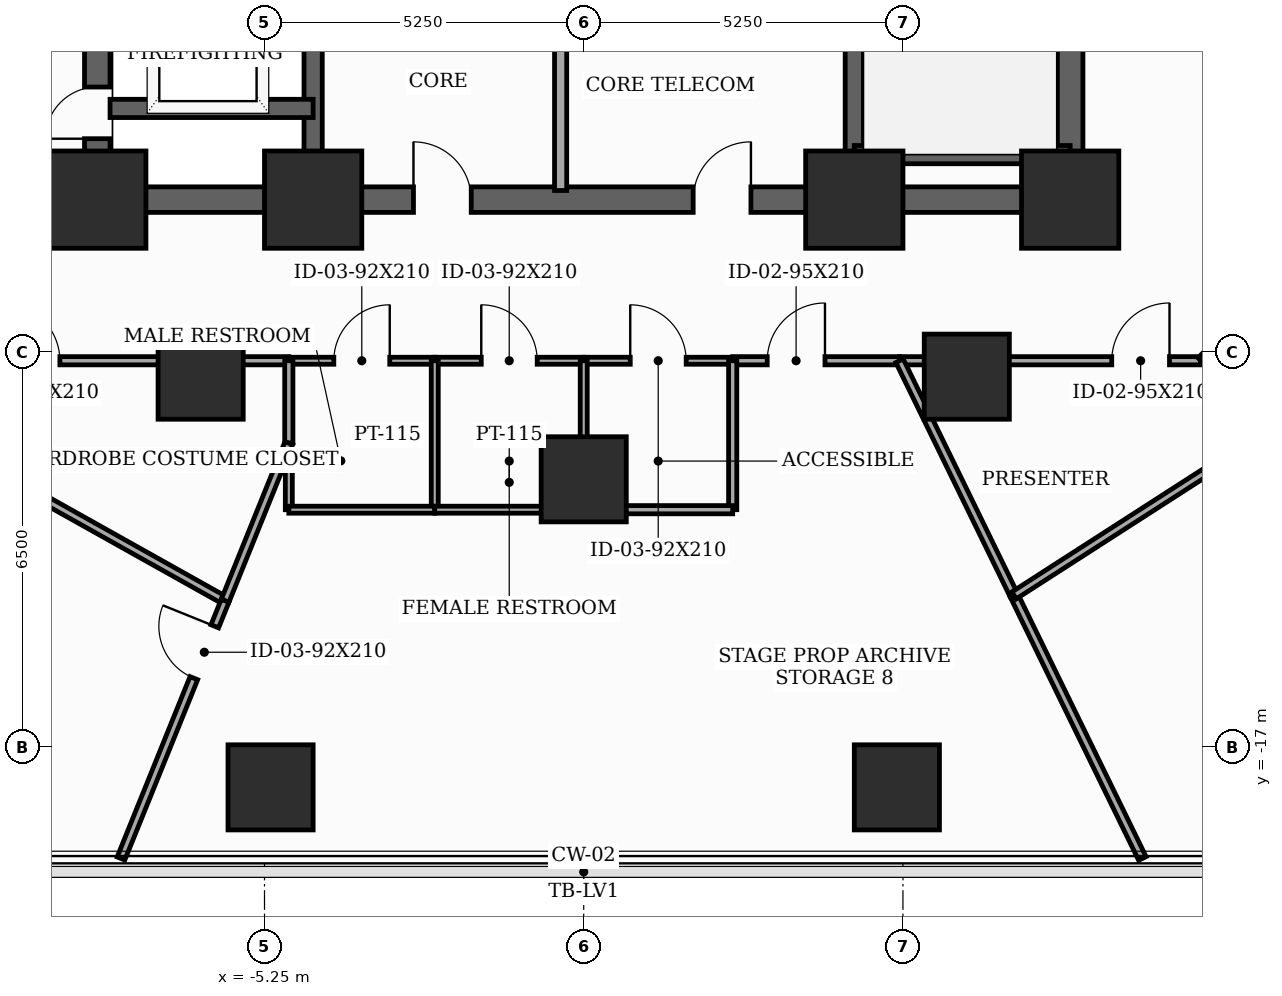
"""IFC4 building model, lengths in metres.
Left out: names, types, materials, properties, quantities, classifications, styles, units other than length and angle.
Written with IfcOpenShell. Run it as: python <this file> out.ifc"""

import sys

from ifc_helpers import new_model, si_unit, direction, frame, frame_2d, origin, origin_2d, place, context, subcontext, project, spatial, rectangle, extrude, element, fill, save


model = new_model("IFC4")
c1 = context("Model", 3, precision=1e-05, world=origin(), true_north=direction((0.0, 1.0)))
c2 = subcontext(c1, "Body", "Model", "MODEL_VIEW")
j1 = project(units=[si_unit("LENGTHUNIT", "METRE"), si_unit("PLANEANGLEUNIT", "RADIAN")], contexts=[c1])
p1 = place(None, origin())
s1 = spatial("IfcSite", under=j1, at=p1, CompositionType="ELEMENT")
p2 = place(p1, origin())
s2 = spatial("IfcBuilding", under=s1, at=p2, CompositionType="ELEMENT")
p3 = place(p2, frame((0.0, 0.0, 37.1)))
s3 = spatial("IfcBuildingStorey", under=s2, at=p3, CompositionType="ELEMENT", Elevation=37.1)
for number, where, z_axis, x_axis in (
    (1, (-8.0, -8.0, 0.0), (0.0, 0.0, 1.0), (1.0, 0.0, 0.0)),
    (2, (-4.45, -8.0, 0.0), (0.0, 0.0, 1.0), (1.0, 0.0, 0.0)),
    (3, (4.45, -8.0, 0.0), (0.0, 0.0, 1.0), (1.0, 0.0, 0.0)),
    (4, (8.0, -8.0, 0.0), (0.0, 0.0, 1.0), (1.0, 0.0, 0.0)),
):
    element("IfcColumn", number, at=place(p3, frame(where, z_axis=z_axis, x_axis=x_axis)), inside=s3, PredefinedType="COLUMN", context=c2, shape_type="SweptSolid", body=[
        extrude(rectangle(XDim=1.6, YDim=1.6, at=origin_2d()), origin(), (0.0, 0.0, 1.0), 3.7),
    ])
for number, where, z_axis, x_axis in (
    (5, (-6.3, -10.912, 0.0), (0.0, 0.0, 1.0), (1.0, 0.0, 0.0)),
    (6, (0.0, -12.6, 0.0), (0.0, 0.0, 1.0), (1.0, 0.0, 0.0)),
    (7, (6.3, -10.912, 0.0), (0.0, 0.0, 1.0), (1.0, 0.0, 0.0)),
    (8, (-5.15, -17.667, 0.0), (0.0, 0.0, 1.0), (1.0, 0.0, 0.0)),
    (9, (5.15, -17.667, 0.0), (0.0, 0.0, 1.0), (1.0, 0.0, 0.0)),
):
    element("IfcColumn", number, at=place(p3, frame(where, z_axis=z_axis, x_axis=x_axis)), inside=s3, PredefinedType="COLUMN", context=c2, shape_type="SweptSolid", body=[
        extrude(rectangle(XDim=1.4, YDim=1.4, at=origin_2d()), origin(), (0.0, 0.0, 1.0), 3.7),
    ])
p4 = place(p3, frame((-8.0, -8.0, 0.0), z_axis=(0.0, 0.0, 1.0), x_axis=(0.0, 1.0, 0.0)))
e10 = element("IfcWall", 10, at=p4, inside=s3, PredefinedType="SHEAR", context=c2, shape_type="SweptSolid", body=[
    extrude(rectangle(XDim=16.0, YDim=0.42, at=frame_2d((8.0, 0.0))), origin(), (0.0, 0.0, 1.0), 3.5),
])
p5 = place(p4, frame((1.002, 0.0, 0.0)))
e11 = element("IfcOpeningElement", 11, at=p5, cuts=e10, PredefinedType="OPENING", context=c2, shape_type="SweptSolid", body=[
    extrude(rectangle(XDim=0.85, YDim=2.02, at=frame_2d((0.425, 1.01))), frame((0.0, 0.22, 0.0), z_axis=(0.0, -1.0, 0.0), x_axis=(1.0, 0.0, 0.0)), (0.0, 0.0, 1.0), 0.44),
])
p6 = place(p4, frame((5.35, 0.0, 0.0)))
e12 = element("IfcOpeningElement", 12, at=p6, cuts=e10, PredefinedType="OPENING", context=c2, shape_type="SweptSolid", body=[
    extrude(rectangle(XDim=1.05, YDim=2.15, at=frame_2d((0.525, 1.075))), frame((0.0, 0.22, 0.0), z_axis=(0.0, -1.0, 0.0), x_axis=(1.0, 0.0, 0.0)), (0.0, 0.0, 1.0), 0.44),
])
p7 = place(p3, frame((8.0, -8.0, 0.0), z_axis=(0.0, 0.0, 1.0), x_axis=(0.0, 1.0, 0.0)))
e13 = element("IfcWall", 13, at=p7, inside=s3, PredefinedType="SHEAR", context=c2, shape_type="SweptSolid", body=[
    extrude(rectangle(XDim=16.0, YDim=0.42, at=frame_2d((8.0, 0.0))), origin(), (0.0, 0.0, 1.0), 3.5),
])
p8 = place(p7, frame((9.6, 0.0, 0.0)))
e14 = element("IfcOpeningElement", 14, at=p8, cuts=e13, PredefinedType="OPENING", context=c2, shape_type="SweptSolid", body=[
    extrude(rectangle(XDim=1.05, YDim=2.15, at=frame_2d((0.525, 1.075))), frame((0.0, 0.22, 0.0), z_axis=(0.0, -1.0, 0.0), x_axis=(1.0, 0.0, 0.0)), (0.0, 0.0, 1.0), 0.44),
])
p9 = place(p7, frame((14.148, 0.0, 0.0)))
e15 = element("IfcOpeningElement", 15, at=p9, cuts=e13, PredefinedType="OPENING", context=c2, shape_type="SweptSolid", body=[
    extrude(rectangle(XDim=0.85, YDim=2.02, at=frame_2d((0.425, 1.01))), frame((0.0, 0.22, 0.0), z_axis=(0.0, -1.0, 0.0), x_axis=(1.0, 0.0, 0.0)), (0.0, 0.0, 1.0), 0.44),
])
p10 = place(p3, frame((-8.0, -8.0, 0.0), z_axis=(0.0, 0.0, 1.0), x_axis=(1.0, 0.0, 0.0)))
e16 = element("IfcWall", 16, at=p10, inside=s3, PredefinedType="SHEAR", context=c2, shape_type="SweptSolid", body=[
    extrude(rectangle(XDim=16.0, YDim=0.42, at=frame_2d((8.0, 0.0))), origin(), (0.0, 0.0, 1.0), 3.5),
])
p11 = place(p10, frame((5.2, 0.0, 0.0)))
e17 = element("IfcOpeningElement", 17, at=p11, cuts=e16, PredefinedType="OPENING", context=c2, shape_type="SweptSolid", body=[
    extrude(rectangle(XDim=0.95, YDim=2.1, at=frame_2d((0.475, 1.05))), frame((0.0, 0.22, 0.0), z_axis=(0.0, -1.0, 0.0), x_axis=(1.0, 0.0, 0.0)), (0.0, 0.0, 1.0), 0.44),
])
p12 = place(p10, frame((9.8, 0.0, 0.0)))
e18 = element("IfcOpeningElement", 18, at=p12, cuts=e16, PredefinedType="OPENING", context=c2, shape_type="SweptSolid", body=[
    extrude(rectangle(XDim=0.95, YDim=2.1, at=frame_2d((0.475, 1.05))), frame((0.0, 0.22, 0.0), z_axis=(0.0, -1.0, 0.0), x_axis=(1.0, 0.0, 0.0)), (0.0, 0.0, 1.0), 0.44),
])
for number, where, z_axis, x_axis in (
    (19, (-4.45, -7.79, 0.0), (0.0, 0.0, 1.0), (0.0, 1.0, 0.0)),
    (20, (4.45, -7.79, 0.0), (0.0, 0.0, 1.0), (0.0, 1.0, 0.0)),
):
    element("IfcWall", number, at=place(p3, frame(where, z_axis=z_axis, x_axis=x_axis)), inside=s3, PredefinedType="SHEAR", context=c2, shape_type="SweptSolid", body=[
        extrude(rectangle(XDim=15.58, YDim=0.3, at=frame_2d((7.79, 0.0))), origin(), (0.0, 0.0, 1.0), 3.5),
    ])
p13 = place(p3, frame((4.45, -7.26, 0.0), z_axis=(0.0, 0.0, 1.0), x_axis=(1.0, 0.0, 0.0)))
e21 = element("IfcWall", 21, at=p13, inside=s3, PredefinedType="SHEAR", context=c2, shape_type="SweptSolid", body=[
    extrude(rectangle(XDim=3.55, YDim=0.3, at=frame_2d((1.775, 0.0))), origin(), (0.0, 0.0, 1.0), 3.5),
])
p14 = place(p3, frame((-7.79, -6.5, 0.0), z_axis=(0.0, 0.0, 1.0), x_axis=(1.0, 0.0, 0.0)))
e22 = element("IfcWall", 22, at=p14, inside=s3, PredefinedType="SHEAR", context=c2, shape_type="SweptSolid", body=[
    extrude(rectangle(XDim=3.34, YDim=0.3, at=frame_2d((1.67, 0.0))), origin(), (0.0, 0.0, 1.0), 3.5),
])
p15 = place(p3, frame((-0.38, -7.85, 0.0), z_axis=(0.0, 0.0, 1.0), x_axis=(0.0, 1.0, 0.0)))
e23 = element("IfcWall", 23, at=p15, inside=s3, PredefinedType="SOLIDWALL", context=c2, shape_type="SweptSolid", body=[
    extrude(rectangle(XDim=2.95, YDim=0.2, at=frame_2d((1.475, 0.0))), origin(), (0.0, 0.0, 1.0), 2.885),
])
p16 = place(p3, frame((-10.15, -10.65, 0.0), z_axis=(0.0, 0.0, 1.0), x_axis=(1.0, 0.0, 0.0)))
e24 = element("IfcWall", 24, at=p16, inside=s3, PredefinedType="PARTITIONING", context=c2, shape_type="SweptSolid", body=[
    extrude(rectangle(XDim=5.3, YDim=0.135, at=frame_2d((2.65, 0.0))), origin(), (0.0, 0.0, 1.0), 2.785),
])
p17 = place(p16, frame((0.585, 0.0, 0.0)))
e25 = element("IfcOpeningElement", 25, at=p17, cuts=e24, PredefinedType="OPENING", context=c2, shape_type="SweptSolid", body=[
    extrude(rectangle(XDim=0.95, YDim=2.1, at=frame_2d((0.475, 1.05))), frame((0.0, 0.077, 0.0), z_axis=(0.0, -1.0, 0.0), x_axis=(1.0, 0.0, 0.0)), (0.0, 0.0, 1.0), 0.155),
])
p18 = place(p3, frame((-4.85, -10.65, 0.0), z_axis=(0.0, 0.0, 1.0), x_axis=(1.0, 0.0, 0.0)))
e26 = element("IfcWall", 26, at=p18, inside=s3, PredefinedType="PARTITIONING", context=c2, shape_type="SweptSolid", body=[
    extrude(rectangle(XDim=2.4, YDim=0.115, at=frame_2d((1.2, 0.0))), origin(), (0.0, 0.0, 1.0), 3.5),
])
p19 = place(p18, frame((0.74, 0.0, 0.0)))
e27 = element("IfcOpeningElement", 27, at=p19, cuts=e26, PredefinedType="OPENING", context=c2, shape_type="SweptSolid", body=[
    extrude(rectangle(XDim=0.92, YDim=2.1, at=frame_2d((0.46, 1.05))), frame((0.0, 0.067, 0.0), z_axis=(0.0, -1.0, 0.0), x_axis=(1.0, 0.0, 0.0)), (0.0, 0.0, 1.0), 0.135),
])
p20 = place(p3, frame((-2.45, -10.65, 0.0), z_axis=(0.0, 0.0, 1.0), x_axis=(1.0, 0.0, 0.0)))
e28 = element("IfcWall", 28, at=p20, inside=s3, PredefinedType="PARTITIONING", context=c2, shape_type="SweptSolid", body=[
    extrude(rectangle(XDim=2.45, YDim=0.115, at=frame_2d((1.225, 0.0))), origin(), (0.0, 0.0, 1.0), 2.785),
])
p21 = place(p20, frame((0.765, 0.0, 0.0)))
e29 = element("IfcOpeningElement", 29, at=p21, cuts=e28, PredefinedType="OPENING", context=c2, shape_type="SweptSolid", body=[
    extrude(rectangle(XDim=0.92, YDim=2.1, at=frame_2d((0.46, 1.05))), frame((0.0, 0.067, 0.0), z_axis=(0.0, -1.0, 0.0), x_axis=(1.0, 0.0, 0.0)), (0.0, 0.0, 1.0), 0.135),
])
p22 = place(p3, frame((2.45, -10.65, 0.0), z_axis=(0.0, 0.0, 1.0), x_axis=(1.0, 0.0, 0.0)))
e30 = element("IfcWall", 30, at=p22, inside=s3, PredefinedType="PARTITIONING", context=c2, shape_type="SweptSolid", body=[
    extrude(rectangle(XDim=2.744, YDim=0.135, at=frame_2d((1.372, 0.0))), origin(), (0.0, 0.0, 1.0), 3.5),
])
p23 = place(p22, frame((0.568, 0.0, 0.0)))
e31 = element("IfcOpeningElement", 31, at=p23, cuts=e30, PredefinedType="OPENING", context=c2, shape_type="SweptSolid", body=[
    extrude(rectangle(XDim=0.95, YDim=2.1, at=frame_2d((0.475, 1.05))), frame((0.0, 0.077, 0.0), z_axis=(0.0, -1.0, 0.0), x_axis=(1.0, 0.0, 0.0)), (0.0, 0.0, 1.0), 0.155),
])
p24 = place(p3, frame((0.0, -10.65, 0.0), z_axis=(0.0, 0.0, 1.0), x_axis=(1.0, 0.0, 0.0)))
e32 = element("IfcWall", 32, at=p24, inside=s3, PredefinedType="PARTITIONING", context=c2, shape_type="SweptSolid", body=[
    extrude(rectangle(XDim=2.45, YDim=0.115, at=frame_2d((1.225, 0.0))), origin(), (0.0, 0.0, 1.0), 3.5),
])
p25 = place(p24, frame((0.765, 0.0, 0.0)))
e33 = element("IfcOpeningElement", 33, at=p25, cuts=e32, PredefinedType="OPENING", context=c2, shape_type="SweptSolid", body=[
    extrude(rectangle(XDim=0.92, YDim=2.1, at=frame_2d((0.46, 1.05))), frame((0.0, 0.067, 0.0), z_axis=(0.0, -1.0, 0.0), x_axis=(1.0, 0.0, 0.0)), (0.0, 0.0, 1.0), 0.135),
])
p26 = place(p3, frame((5.194, -10.65, 0.0), z_axis=(0.0, 0.0, 1.0), x_axis=(1.0, 0.0, 0.0)))
e34 = element("IfcWall", 34, at=p26, inside=s3, PredefinedType="PARTITIONING", context=c2, shape_type="SweptSolid", body=[
    extrude(rectangle(XDim=4.956, YDim=0.135, at=frame_2d((2.478, 0.0))), origin(), (0.0, 0.0, 1.0), 2.785),
])
p27 = place(p26, frame((3.49, 0.0, 0.0)))
e35 = element("IfcOpeningElement", 35, at=p27, cuts=e34, PredefinedType="OPENING", context=c2, shape_type="SweptSolid", body=[
    extrude(rectangle(XDim=0.95, YDim=2.1, at=frame_2d((0.475, 1.05))), frame((0.0, 0.077, 0.0), z_axis=(0.0, -1.0, 0.0), x_axis=(1.0, 0.0, 0.0)), (0.0, 0.0, 1.0), 0.155),
])
p28 = place(p3, frame((10.15, -10.65, 0.0), z_axis=(0.0, 0.0, 1.0), x_axis=(0.707106781187, 0.707106781187, 0.0)))
e36 = element("IfcWall", 36, at=p28, inside=s3, PredefinedType="PARTITIONING", context=c2, shape_type="SweptSolid", body=[
    extrude(rectangle(XDim=0.707, YDim=0.135, at=frame_2d((0.354, 0.0))), origin(), (0.0, 0.0, 1.0), 3.5),
])
p29 = place(p3, frame((-5.897, -14.596, 0.0), z_axis=(0.0, 0.0, 1.0), x_axis=(-0.87248894478, 0.488633851915, 0.0)))
e37 = element("IfcWall", 37, at=p29, inside=s3, PredefinedType="PARTITIONING", context=c2, shape_type="SweptSolid", body=[
    extrude(rectangle(XDim=4.39, YDim=0.135, at=frame_2d((2.195, 0.0))), origin(), (0.0, 0.0, 1.0), 2.685),
])
p30 = place(p3, frame((-7.61, -18.837, 0.0), z_axis=(0.0, 0.0, 1.0), x_axis=(0.374545124537, 0.927208687236, 0.0)))
e38 = element("IfcWall", 38, at=p30, inside=s3, PredefinedType="PARTITIONING", context=c2, shape_type="SweptSolid", body=[
    extrude(rectangle(XDim=4.574, YDim=0.135, at=frame_2d((2.287, 0.0))), origin(), (0.0, 0.0, 1.0), 2.685),
])
p31 = place(p30, frame((3.199, 0.0, 0.0)))
e39 = element("IfcOpeningElement", 39, at=p31, cuts=e38, PredefinedType="OPENING", context=c2, shape_type="SweptSolid", body=[
    extrude(rectangle(XDim=0.92, YDim=2.1, at=frame_2d((0.46, 1.05))), frame((0.0, 0.077, 0.0), z_axis=(0.0, -1.0, 0.0), x_axis=(1.0, 0.0, 0.0)), (0.0, 0.0, 1.0), 0.155),
])
p32 = place(p3, frame((-4.85, -12.004, 0.0), z_axis=(0.0, 0.0, 1.0), x_axis=(0.0, 1.0, 0.0)))
e40 = element("IfcWall", 40, at=p32, inside=s3, PredefinedType="PARTITIONING", context=c2, shape_type="SweptSolid", body=[
    extrude(rectangle(XDim=1.354, YDim=0.135, at=frame_2d((0.677, 0.0))), origin(), (0.0, 0.0, 1.0), 2.785),
])
p33 = place(p3, frame((-5.897, -14.596, 0.0), z_axis=(0.0, 0.0, 1.0), x_axis=(0.374490485533, 0.92723075674, 0.0)))
e41 = element("IfcWall", 41, at=p33, inside=s3, PredefinedType="PARTITIONING", context=c2, shape_type="SweptSolid", body=[
    extrude(rectangle(XDim=2.795, YDim=0.135, at=frame_2d((1.398, 0.0))), origin(), (0.0, 0.0, 1.0), 2.685),
])
p34 = place(p3, frame((-2.45, -13.1, 0.0), z_axis=(0.0, 0.0, 1.0), x_axis=(0.0, 1.0, 0.0)))
e42 = element("IfcWall", 42, at=p34, inside=s3, PredefinedType="PARTITIONING", context=c2, shape_type="SweptSolid", body=[
    extrude(rectangle(XDim=2.45, YDim=0.115, at=frame_2d((1.225, 0.0))), origin(), (0.0, 0.0, 1.0), 2.785),
])
p35 = place(p3, frame((-4.85, -12.298, 0.0), z_axis=(0.0, 0.0, 1.0), x_axis=(0.0, -1.0, 0.0)))
e43 = element("IfcWall", 43, at=p35, inside=s3, PredefinedType="PARTITIONING", context=c2, shape_type="SweptSolid", body=[
    extrude(rectangle(XDim=0.802, YDim=0.115, at=frame_2d((0.401, 0.0))), origin(), (0.0, 0.0, 1.0), 3.5),
])
p36 = place(p3, frame((-4.85, -13.1, 0.0), z_axis=(0.0, 0.0, 1.0), x_axis=(1.0, 0.0, 0.0)))
e44 = element("IfcWall", 44, at=p36, inside=s3, PredefinedType="PARTITIONING", context=c2, shape_type="SweptSolid", body=[
    extrude(rectangle(XDim=2.4, YDim=0.115, at=frame_2d((1.2, 0.0))), origin(), (0.0, 0.0, 1.0), 3.5),
])
p37 = place(p3, frame((-2.45, -13.1, 0.0), z_axis=(0.0, 0.0, 1.0), x_axis=(1.0, 0.0, 0.0)))
e45 = element("IfcWall", 45, at=p37, inside=s3, PredefinedType="PARTITIONING", context=c2, shape_type="SweptSolid", body=[
    extrude(rectangle(XDim=2.45, YDim=0.115, at=frame_2d((1.225, 0.0))), origin(), (0.0, 0.0, 1.0), 3.5),
])
p38 = place(p3, frame((0.0, -13.1, 0.0), z_axis=(0.0, 0.0, 1.0), x_axis=(0.0, 1.0, 0.0)))
e46 = element("IfcWall", 46, at=p38, inside=s3, PredefinedType="PARTITIONING", context=c2, shape_type="SweptSolid", body=[
    extrude(rectangle(XDim=2.45, YDim=0.115, at=frame_2d((1.225, 0.0))), origin(), (0.0, 0.0, 1.0), 2.785),
])
p39 = place(p3, frame((2.45, -10.65, 0.0), z_axis=(0.0, 0.0, 1.0), x_axis=(0.0, -1.0, 0.0)))
e47 = element("IfcWall", 47, at=p39, inside=s3, PredefinedType="PARTITIONING", context=c2, shape_type="SweptSolid", body=[
    extrude(rectangle(XDim=2.45, YDim=0.135, at=frame_2d((1.225, 0.0))), origin(), (0.0, 0.0, 1.0), 2.785),
])
p40 = place(p3, frame((2.45, -13.1, 0.0), z_axis=(0.0, 0.0, 1.0), x_axis=(-1.0, 0.0, 0.0)))
e48 = element("IfcWall", 48, at=p40, inside=s3, PredefinedType="PARTITIONING", context=c2, shape_type="SweptSolid", body=[
    extrude(rectangle(XDim=2.45, YDim=0.135, at=frame_2d((1.225, 0.0))), origin(), (0.0, 0.0, 1.0), 3.5),
])
p41 = place(p3, frame((7.077, -14.51, 0.0), z_axis=(0.0, 0.0, 1.0), x_axis=(-0.438392272504, 0.898783742292, 0.0)))
e49 = element("IfcWall", 49, at=p41, inside=s3, PredefinedType="PARTITIONING", context=c2, shape_type="SweptSolid", body=[
    extrude(rectangle(XDim=4.295, YDim=0.135, at=frame_2d((2.147, 0.0))), origin(), (0.0, 0.0, 1.0), 2.685),
])
p42 = place(p3, frame((9.188, -18.837, 0.0), z_axis=(0.0, 0.0, 1.0), x_axis=(-0.438408644876, 0.898775756292, 0.0)))
e50 = element("IfcWall", 50, at=p42, inside=s3, PredefinedType="PARTITIONING", context=c2, shape_type="SweptSolid", body=[
    extrude(rectangle(XDim=4.814, YDim=0.135, at=frame_2d((2.407, 0.0))), origin(), (0.0, 0.0, 1.0), 2.935),
])
p43 = place(p3, frame((7.077, -14.51, 0.0), z_axis=(0.0, 0.0, 1.0), x_axis=(0.841056333741, 0.540947542258, 0.0)))
e51 = element("IfcWall", 51, at=p43, inside=s3, PredefinedType="PARTITIONING", context=c2, shape_type="SweptSolid", body=[
    extrude(rectangle(XDim=4.222, YDim=0.135, at=frame_2d((2.111, 0.0))), origin(), (0.0, 0.0, 1.0), 2.685),
])
p44 = place(p5, origin())
e52 = element("IfcDoor", 52, at=p44, inside=s3, OperationType="SINGLE_SWING_LEFT", PredefinedType="TRAPDOOR", context=c2, shape_type="SweptSolid", body=[
    extrude(rectangle(XDim=0.85, YDim=2.02, at=frame_2d((0.425, 1.01))), frame((0.0, 0.025, 0.0), z_axis=(0.0, -1.0, 0.0), x_axis=(1.0, 0.0, 0.0)), (0.0, 0.0, 1.0), 0.05),
])
fill(e11, e52)
p45 = place(p11, origin())
e53 = element("IfcDoor", 53, at=p45, inside=s3, OperationType="SINGLE_SWING_LEFT", PredefinedType="DOOR", context=c2, shape_type="SweptSolid", body=[
    extrude(rectangle(XDim=0.95, YDim=2.1, at=frame_2d((0.475, 1.05))), frame((0.0, 0.025, 0.0), z_axis=(0.0, -1.0, 0.0), x_axis=(1.0, 0.0, 0.0)), (0.0, 0.0, 1.0), 0.05),
])
fill(e17, e53)
p46 = place(p12, origin())
e54 = element("IfcDoor", 54, at=p46, inside=s3, OperationType="SINGLE_SWING_RIGHT", PredefinedType="DOOR", context=c2, shape_type="SweptSolid", body=[
    extrude(rectangle(XDim=0.95, YDim=2.1, at=frame_2d((0.475, 1.05))), frame((0.0, 0.025, 0.0), z_axis=(0.0, -1.0, 0.0), x_axis=(1.0, 0.0, 0.0)), (0.0, 0.0, 1.0), 0.05),
])
fill(e18, e54)
p47 = place(p17, origin())
e55 = element("IfcDoor", 55, at=p47, inside=s3, OperationType="SINGLE_SWING_LEFT", PredefinedType="DOOR", context=c2, shape_type="SweptSolid", body=[
    extrude(rectangle(XDim=0.95, YDim=2.1, at=frame_2d((0.475, 1.05))), frame((0.0, 0.025, 0.0), z_axis=(0.0, -1.0, 0.0), x_axis=(1.0, 0.0, 0.0)), (0.0, 0.0, 1.0), 0.05),
])
fill(e25, e55)
p48 = place(p19, origin())
e56 = element("IfcDoor", 56, at=p48, inside=s3, OperationType="SINGLE_SWING_RIGHT", PredefinedType="DOOR", context=c2, shape_type="SweptSolid", body=[
    extrude(rectangle(XDim=0.92, YDim=2.1, at=frame_2d((0.46, 1.05))), frame((0.0, 0.025, 0.0), z_axis=(0.0, -1.0, 0.0), x_axis=(1.0, 0.0, 0.0)), (0.0, 0.0, 1.0), 0.05),
])
fill(e27, e56)
p49 = place(p21, origin())
e57 = element("IfcDoor", 57, at=p49, inside=s3, OperationType="SINGLE_SWING_LEFT", PredefinedType="DOOR", context=c2, shape_type="SweptSolid", body=[
    extrude(rectangle(XDim=0.92, YDim=2.1, at=frame_2d((0.46, 1.05))), frame((0.0, 0.025, 0.0), z_axis=(0.0, -1.0, 0.0), x_axis=(1.0, 0.0, 0.0)), (0.0, 0.0, 1.0), 0.05),
])
fill(e29, e57)
p50 = place(p23, origin())
e58 = element("IfcDoor", 58, at=p50, inside=s3, OperationType="SINGLE_SWING_RIGHT", PredefinedType="DOOR", context=c2, shape_type="SweptSolid", body=[
    extrude(rectangle(XDim=0.95, YDim=2.1, at=frame_2d((0.475, 1.05))), frame((0.0, 0.025, 0.0), z_axis=(0.0, -1.0, 0.0), x_axis=(1.0, 0.0, 0.0)), (0.0, 0.0, 1.0), 0.05),
])
fill(e31, e58)
p51 = place(p25, origin())
e59 = element("IfcDoor", 59, at=p51, inside=s3, OperationType="SINGLE_SWING_LEFT", PredefinedType="DOOR", context=c2, shape_type="SweptSolid", body=[
    extrude(rectangle(XDim=0.92, YDim=2.1, at=frame_2d((0.46, 1.05))), frame((0.0, 0.025, 0.0), z_axis=(0.0, -1.0, 0.0), x_axis=(1.0, 0.0, 0.0)), (0.0, 0.0, 1.0), 0.05),
])
fill(e33, e59)
p52 = place(p27, origin())
e60 = element("IfcDoor", 60, at=p52, inside=s3, OperationType="SINGLE_SWING_RIGHT", PredefinedType="DOOR", context=c2, shape_type="SweptSolid", body=[
    extrude(rectangle(XDim=0.95, YDim=2.1, at=frame_2d((0.475, 1.05))), frame((0.0, 0.025, 0.0), z_axis=(0.0, -1.0, 0.0), x_axis=(1.0, 0.0, 0.0)), (0.0, 0.0, 1.0), 0.05),
])
fill(e35, e60)
p53 = place(p31, origin())
e61 = element("IfcDoor", 61, at=p53, inside=s3, OperationType="SINGLE_SWING_RIGHT", PredefinedType="DOOR", context=c2, shape_type="SweptSolid", body=[
    extrude(rectangle(XDim=0.92, YDim=2.1, at=frame_2d((0.46, 1.05))), frame((0.0, 0.025, 0.0), z_axis=(0.0, -1.0, 0.0), x_axis=(1.0, 0.0, 0.0)), (0.0, 0.0, 1.0), 0.05),
])
fill(e39, e61)
save(model, sys.argv[1])
